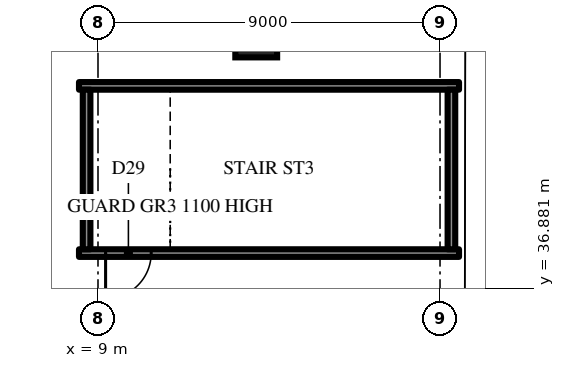
"""IFC4 building model, lengths in metres.
Left out: names, types, materials, properties, quantities, classifications, styles, units other than length and angle.
Written with IfcOpenShell. Run it as: python <this file> out.ifc"""

import sys

from ifc_helpers import new_model, si_unit, direction, frame, frame_2d, origin, origin_2d, place, context, subcontext, project, spatial, rectangle, extrude, element, fill, save


model = new_model("IFC4")
c1 = context("Model", 3, precision=1e-05, world=origin(), true_north=direction((0.0, 1.0)))
c2 = subcontext(c1, "Body", "Model", "MODEL_VIEW")
j1 = project(units=[si_unit("LENGTHUNIT", "METRE"), si_unit("PLANEANGLEUNIT", "RADIAN")], contexts=[c1])
p1 = place(None, origin())
s1 = spatial("IfcSite", under=j1, at=p1, CompositionType="ELEMENT")
p2 = place(p1, origin())
s2 = spatial("IfcBuilding", under=s1, at=p2, CompositionType="ELEMENT")
p3 = place(p2, frame((0.0, 0.0, 18.5)))
s3 = spatial("IfcBuildingStorey", under=s2, at=p3, CompositionType="ELEMENT", Elevation=18.5)
p4 = place(p3, frame((8.5, 37.8, 0.0), z_axis=(0.0, 0.0, 1.0), x_axis=(1.0, 0.0, 0.0)))
e1 = element("IfcWall", 1, at=p4, inside=s3, PredefinedType="SHEAR", context=c2, shape_type="SweptSolid", body=[
    extrude(rectangle(XDim=10.0, YDim=0.2, at=frame_2d((5.0, 0.0))), origin(), (0.0, 0.0, 1.0), 5.0),
])
p5 = place(p4, frame((0.7, 0.0, 0.0)))
e2 = element("IfcOpeningElement", 2, at=p5, cuts=e1, PredefinedType="OPENING", context=c2, shape_type="SweptSolid", body=[
    extrude(rectangle(XDim=1.2, YDim=2.2, at=frame_2d((0.6, 1.1))), frame((0.0, 0.11, 0.0), z_axis=(0.0, -1.0, 0.0), x_axis=(1.0, 0.0, 0.0)), (0.0, 0.0, 1.0), 0.22),
])
p6 = place(p3, frame((18.5, 42.2, 0.0), z_axis=(0.0, 0.0, 1.0), x_axis=(-1.0, 0.0, 0.0)))
e3 = element("IfcWall", 3, at=p6, inside=s3, PredefinedType="SHEAR", context=c2, shape_type="SweptSolid", body=[
    extrude(rectangle(XDim=10.0, YDim=0.2, at=frame_2d((5.0, 0.0))), origin(), (0.0, 0.0, 1.0), 5.0),
])
for number, where, z_axis, x_axis in (
    (4, (8.7, 42.1, 0.0), (0.0, 0.0, 1.0), (0.0, -1.0, 0.0)),
    (5, (18.3, 37.9, 0.0), (0.0, 0.0, 1.0), (0.0, 1.0, 0.0)),
):
    element("IfcWall", number, at=place(p3, frame(where, z_axis=z_axis, x_axis=x_axis)), inside=s3, PredefinedType="SHEAR", context=c2, shape_type="SweptSolid", body=[
        extrude(rectangle(XDim=4.2, YDim=0.2, at=frame_2d((2.1, 0.0))), origin(), (0.0, 0.0, 1.0), 5.0),
    ])
p7 = place(p3, frame((13.164, 43.5, 0.0), z_axis=(0.0, 0.0, 1.0), x_axis=(-1.0, 0.0, 0.0)))
e6 = element("IfcColumn", 6, at=p7, inside=s3, PredefinedType="COLUMN", context=c2, shape_type="SweptSolid", body=[
    extrude(rectangle(XDim=1.1, YDim=1.1, at=origin_2d()), origin(), (0.0, 0.0, 1.0), 5.0),
])
p8 = place(p5, frame((1.2, 0.0, 0.0), z_axis=(0.0, 0.0, 1.0), x_axis=(-1.0, 0.0, 0.0)))
e7 = element("IfcDoor", 7, at=p8, inside=s3, OperationType="SINGLE_SWING_LEFT", PredefinedType="DOOR", context=c2, shape_type="SweptSolid", body=[
    extrude(rectangle(XDim=1.2, YDim=2.2, at=frame_2d((0.6, 1.1))), frame((0.0, 0.025, 0.0), z_axis=(0.0, -1.0, 0.0), x_axis=(1.0, 0.0, 0.0)), (0.0, 0.0, 1.0), 0.05),
])
fill(e2, e7)
save(model, sys.argv[1])
